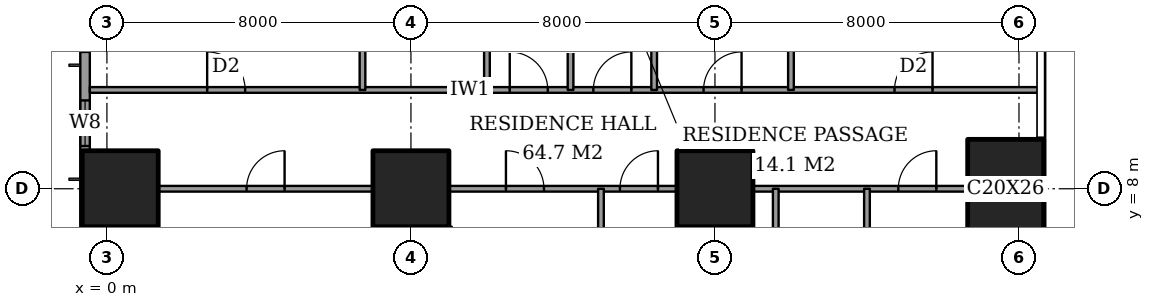
"""IFC4 building model, lengths in metres.
Left out: names, types, materials, properties, quantities, classifications, styles, units other than length and angle.
Written with IfcOpenShell. Run it as: python <this file> out.ifc"""

import sys

from ifc_helpers import new_model, si_unit, direction, frame, frame_2d, origin, origin_2d, place, context, subcontext, project, spatial, rectangle, extrude, element, fill, save


model = new_model("IFC4")
c1 = context("Model", 3, precision=1e-05, world=origin(), true_north=direction((0.0, 1.0)))
c2 = subcontext(c1, "Body", "Model", "MODEL_VIEW")
j1 = project(units=[si_unit("LENGTHUNIT", "METRE"), si_unit("PLANEANGLEUNIT", "RADIAN")], contexts=[c1])
p1 = place(None, origin())
s1 = spatial("IfcSite", under=j1, at=p1, CompositionType="ELEMENT")
p2 = place(p1, origin())
s2 = spatial("IfcBuilding", under=s1, at=p2, CompositionType="ELEMENT")
p3 = place(p2, frame((0.0, 0.0, 47.6)))
s3 = spatial("IfcBuildingStorey", under=s2, at=p3, CompositionType="ELEMENT", Elevation=47.6)
for number, where, z_axis, x_axis in (
    (1, (0.35, 8.0, 0.0), (0.0, 0.0, 1.0), (1.0, 0.0, 0.0)),
    (2, (8.0, 8.0, 0.0), (0.0, 0.0, 1.0), (1.0, 0.0, 0.0)),
    (3, (16.0, 8.0, 0.0), (0.0, 0.0, 1.0), (1.0, 0.0, 0.0)),
):
    element("IfcColumn", number, at=place(p3, frame(where, z_axis=z_axis, x_axis=x_axis)), inside=s3, PredefinedType="COLUMN", context=c2, shape_type="SweptSolid", body=[
        extrude(rectangle(XDim=2.0, YDim=2.0, at=origin_2d()), origin(), (0.0, 0.0, 1.0), 3.6),
    ])
p4 = place(p3, frame((23.65, 8.0, 0.0), z_axis=(0.0, 0.0, 1.0), x_axis=(1.0, 0.0, 0.0)))
e4 = element("IfcColumn", 4, at=p4, inside=s3, PredefinedType="COLUMN", context=c2, shape_type="SweptSolid", body=[
    extrude(rectangle(XDim=2.0, YDim=2.6, at=origin_2d()), origin(), (0.0, 0.0, 1.0), 3.6),
])
p5 = place(p3, frame((-0.575, 44.825, 0.0), z_axis=(0.0, 0.0, 1.0), x_axis=(0.0, -1.0, 0.0)))
e5 = element("IfcWall", 5, at=p5, inside=s3, PredefinedType="SOLIDWALL", context=c2, shape_type="SweptSolid", body=[
    extrude(rectangle(XDim=41.65, YDim=0.25, at=frame_2d((20.825, 0.0))), origin(), (0.0, 0.0, 1.0), 3.6),
])
p6 = place(p5, frame((0.775, 0.0, 0.6)))
e6 = element("IfcOpeningElement", 6, at=p6, cuts=e5, PredefinedType="OPENING", context=c2, shape_type="SweptSolid", body=[
    extrude(rectangle(XDim=2.4, YDim=2.0, at=frame_2d((1.2, 1.0))), frame((0.0, 0.135, 0.0), z_axis=(0.0, -1.0, 0.0), x_axis=(1.0, 0.0, 0.0)), (0.0, 0.0, 1.0), 0.27),
])
p7 = place(p5, frame((6.1, 0.0, 0.6)))
e7 = element("IfcOpeningElement", 7, at=p7, cuts=e5, PredefinedType="OPENING", context=c2, shape_type="SweptSolid", body=[
    extrude(rectangle(XDim=1.2, YDim=2.0, at=frame_2d((0.6, 1.0))), frame((0.0, 0.135, 0.0), z_axis=(0.0, -1.0, 0.0), x_axis=(1.0, 0.0, 0.0)), (0.0, 0.0, 1.0), 0.27),
])
p8 = place(p5, frame((8.425, 0.0, 0.6)))
e8 = element("IfcOpeningElement", 8, at=p8, cuts=e5, PredefinedType="OPENING", context=c2, shape_type="SweptSolid", body=[
    extrude(rectangle(XDim=2.4, YDim=2.0, at=frame_2d((1.2, 1.0))), frame((0.0, 0.135, 0.0), z_axis=(0.0, -1.0, 0.0), x_axis=(1.0, 0.0, 0.0)), (0.0, 0.0, 1.0), 0.27),
])
p9 = place(p5, frame((15.625, 0.0, 0.6)))
e9 = element("IfcOpeningElement", 9, at=p9, cuts=e5, PredefinedType="OPENING", context=c2, shape_type="SweptSolid", body=[
    extrude(rectangle(XDim=2.4, YDim=2.0, at=frame_2d((1.2, 1.0))), frame((0.0, 0.135, 0.0), z_axis=(0.0, -1.0, 0.0), x_axis=(1.0, 0.0, 0.0)), (0.0, 0.0, 1.0), 0.27),
])
p10 = place(p5, frame((23.625, 0.0, 0.6)))
e10 = element("IfcOpeningElement", 10, at=p10, cuts=e5, PredefinedType="OPENING", context=c2, shape_type="SweptSolid", body=[
    extrude(rectangle(XDim=2.4, YDim=2.0, at=frame_2d((1.2, 1.0))), frame((0.0, 0.135, 0.0), z_axis=(0.0, -1.0, 0.0), x_axis=(1.0, 0.0, 0.0)), (0.0, 0.0, 1.0), 0.27),
])
p11 = place(p5, frame((30.825, 0.0, 0.6)))
e11 = element("IfcOpeningElement", 11, at=p11, cuts=e5, PredefinedType="OPENING", context=c2, shape_type="SweptSolid", body=[
    extrude(rectangle(XDim=2.4, YDim=2.0, at=frame_2d((1.2, 1.0))), frame((0.0, 0.135, 0.0), z_axis=(0.0, -1.0, 0.0), x_axis=(1.0, 0.0, 0.0)), (0.0, 0.0, 1.0), 0.27),
])
p12 = place(p5, frame((34.5, 0.0, 0.6)))
e12 = element("IfcOpeningElement", 12, at=p12, cuts=e5, PredefinedType="OPENING", context=c2, shape_type="SweptSolid", body=[
    extrude(rectangle(XDim=1.2, YDim=2.0, at=frame_2d((0.6, 1.0))), frame((0.0, 0.135, 0.0), z_axis=(0.0, -1.0, 0.0), x_axis=(1.0, 0.0, 0.0)), (0.0, 0.0, 1.0), 0.27),
])
p13 = place(p5, frame((38.475, 0.0, 0.6)))
e13 = element("IfcOpeningElement", 13, at=p13, cuts=e5, PredefinedType="OPENING", context=c2, shape_type="SweptSolid", body=[
    extrude(rectangle(XDim=2.4, YDim=2.0, at=frame_2d((1.2, 1.0))), frame((0.0, 0.135, 0.0), z_axis=(0.0, -1.0, 0.0), x_axis=(1.0, 0.0, 0.0)), (0.0, 0.0, 1.0), 0.27),
])
p14 = place(p3, frame((1.35, 8.0, 0.0), z_axis=(0.0, 0.0, 1.0), x_axis=(1.0, 0.0, 0.0)))
e14 = element("IfcWall", 14, at=p14, inside=s3, PredefinedType="PARTITIONING", context=c2, shape_type="SweptSolid", body=[
    extrude(rectangle(XDim=5.65, YDim=0.15, at=frame_2d((2.825, 0.0))), origin(), (0.0, 0.0, 1.0), 3.35),
])
p15 = place(p14, frame((2.325, 0.0, 0.0)))
e15 = element("IfcOpeningElement", 15, at=p15, cuts=e14, PredefinedType="OPENING", context=c2, shape_type="SweptSolid", body=[
    extrude(rectangle(XDim=1.0, YDim=2.1, at=frame_2d((0.5, 1.05))), frame((0.0, 0.085, 0.0), z_axis=(0.0, -1.0, 0.0), x_axis=(1.0, 0.0, 0.0)), (0.0, 0.0, 1.0), 0.17),
])
p16 = place(p3, frame((9.0, 8.0, 0.0), z_axis=(0.0, 0.0, 1.0), x_axis=(1.0, 0.0, 0.0)))
e16 = element("IfcWall", 16, at=p16, inside=s3, PredefinedType="PARTITIONING", context=c2, shape_type="SweptSolid", body=[
    extrude(rectangle(XDim=6.0, YDim=0.15, at=frame_2d((3.0, 0.0))), origin(), (0.0, 0.0, 1.0), 3.35),
])
p17 = place(p16, frame((1.5, 0.0, 0.0)))
e17 = element("IfcOpeningElement", 17, at=p17, cuts=e16, PredefinedType="OPENING", context=c2, shape_type="SweptSolid", body=[
    extrude(rectangle(XDim=1.0, YDim=2.1, at=frame_2d((0.5, 1.05))), frame((0.0, 0.085, 0.0), z_axis=(0.0, -1.0, 0.0), x_axis=(1.0, 0.0, 0.0)), (0.0, 0.0, 1.0), 0.17),
])
p18 = place(p16, frame((4.5, 0.0, 0.0)))
e18 = element("IfcOpeningElement", 18, at=p18, cuts=e16, PredefinedType="OPENING", context=c2, shape_type="SweptSolid", body=[
    extrude(rectangle(XDim=1.0, YDim=2.1, at=frame_2d((0.5, 1.05))), frame((0.0, 0.085, 0.0), z_axis=(0.0, -1.0, 0.0), x_axis=(1.0, 0.0, 0.0)), (0.0, 0.0, 1.0), 0.17),
])
p19 = place(p3, frame((17.0, 8.0, 0.0), z_axis=(0.0, 0.0, 1.0), x_axis=(1.0, 0.0, 0.0)))
e19 = element("IfcWall", 19, at=p19, inside=s3, PredefinedType="PARTITIONING", context=c2, shape_type="SweptSolid", body=[
    extrude(rectangle(XDim=5.65, YDim=0.15, at=frame_2d((2.825, 0.0))), origin(), (0.0, 0.0, 1.0), 3.35),
])
p20 = place(p19, frame((3.825, 0.0, 0.0)))
e20 = element("IfcOpeningElement", 20, at=p20, cuts=e19, PredefinedType="OPENING", context=c2, shape_type="SweptSolid", body=[
    extrude(rectangle(XDim=1.0, YDim=2.1, at=frame_2d((0.5, 1.05))), frame((0.0, 0.085, 0.0), z_axis=(0.0, -1.0, 0.0), x_axis=(1.0, 0.0, 0.0)), (0.0, 0.0, 1.0), 0.17),
])
p21 = place(p3, frame((-0.45, 10.6, 0.0), z_axis=(0.0, 0.0, 1.0), x_axis=(1.0, 0.0, 0.0)))
e21 = element("IfcWall", 21, at=p21, inside=s3, PredefinedType="PARTITIONING", context=c2, shape_type="SweptSolid", body=[
    extrude(rectangle(XDim=25.011, YDim=0.15, at=frame_2d((12.505, 0.0))), origin(), (0.0, 0.0, 1.0), 3.35),
])
p22 = place(p21, frame((13.25, 0.0, 0.0)))
e22 = element("IfcOpeningElement", 22, at=p22, cuts=e21, PredefinedType="OPENING", context=c2, shape_type="SweptSolid", body=[
    extrude(rectangle(XDim=1.0, YDim=2.1, at=frame_2d((0.5, 1.05))), frame((0.0, 0.085, 0.0), z_axis=(0.0, -1.0, 0.0), x_axis=(1.0, 0.0, 0.0)), (0.0, 0.0, 1.0), 0.17),
])
p23 = place(p21, frame((3.087, 0.0, 0.0)))
e23 = element("IfcOpeningElement", 23, at=p23, cuts=e21, PredefinedType="OPENING", context=c2, shape_type="SweptSolid", body=[
    extrude(rectangle(XDim=1.0, YDim=2.1, at=frame_2d((0.5, 1.05))), frame((0.0, 0.085, 0.0), z_axis=(0.0, -1.0, 0.0), x_axis=(1.0, 0.0, 0.0)), (0.0, 0.0, 1.0), 0.17),
])
p24 = place(p21, frame((11.05, 0.0, 0.0)))
e24 = element("IfcOpeningElement", 24, at=p24, cuts=e21, PredefinedType="OPENING", context=c2, shape_type="SweptSolid", body=[
    extrude(rectangle(XDim=1.0, YDim=2.1, at=frame_2d((0.5, 1.05))), frame((0.0, 0.085, 0.0), z_axis=(0.0, -1.0, 0.0), x_axis=(1.0, 0.0, 0.0)), (0.0, 0.0, 1.0), 0.17),
])
p25 = place(p21, frame((16.15, 0.0, 0.0)))
e25 = element("IfcOpeningElement", 25, at=p25, cuts=e21, PredefinedType="OPENING", context=c2, shape_type="SweptSolid", body=[
    extrude(rectangle(XDim=1.0, YDim=2.1, at=frame_2d((0.5, 1.05))), frame((0.0, 0.085, 0.0), z_axis=(0.0, -1.0, 0.0), x_axis=(1.0, 0.0, 0.0)), (0.0, 0.0, 1.0), 0.17),
])
p26 = place(p21, frame((21.175, 0.0, 0.0)))
e26 = element("IfcOpeningElement", 26, at=p26, cuts=e21, PredefinedType="OPENING", context=c2, shape_type="SweptSolid", body=[
    extrude(rectangle(XDim=1.0, YDim=2.1, at=frame_2d((0.5, 1.05))), frame((0.0, 0.085, 0.0), z_axis=(0.0, -1.0, 0.0), x_axis=(1.0, 0.0, 0.0)), (0.0, 0.0, 1.0), 0.17),
])
p27 = place(p3, frame((6.725, 10.6, 0.0), z_axis=(0.0, 0.0, 1.0), x_axis=(0.0, 1.0, 0.0)))
e27 = element("IfcWall", 27, at=p27, inside=s3, PredefinedType="PARTITIONING", context=c2, shape_type="SweptSolid", body=[
    extrude(rectangle(XDim=4.2, YDim=0.15, at=frame_2d((2.1, 0.0))), origin(), (0.0, 0.0, 1.0), 3.35),
])
p28 = place(p27, frame((1.2, 0.0, 0.0)))
e28 = element("IfcOpeningElement", 28, at=p28, cuts=e27, PredefinedType="OPENING", context=c2, shape_type="SweptSolid", body=[
    extrude(rectangle(XDim=0.9, YDim=2.1, at=frame_2d((0.45, 1.05))), frame((0.0, 0.085, 0.0), z_axis=(0.0, -1.0, 0.0), x_axis=(1.0, 0.0, 0.0)), (0.0, 0.0, 1.0), 0.17),
])
p29 = place(p3, frame((10.0, 10.6, 0.0), z_axis=(0.0, 0.0, 1.0), x_axis=(0.0, 1.0, 0.0)))
e29 = element("IfcWall", 29, at=p29, inside=s3, PredefinedType="PARTITIONING", context=c2, shape_type="SweptSolid", body=[
    extrude(rectangle(XDim=11.0, YDim=0.15, at=frame_2d((5.5, 0.0))), origin(), (0.0, 0.0, 1.0), 3.35),
])
p30 = place(p29, frame((8.2, 0.0, 0.0)))
e30 = element("IfcOpeningElement", 30, at=p30, cuts=e29, PredefinedType="OPENING", context=c2, shape_type="SweptSolid", body=[
    extrude(rectangle(XDim=1.0, YDim=2.1, at=frame_2d((0.5, 1.05))), frame((0.0, 0.085, 0.0), z_axis=(0.0, -1.0, 0.0), x_axis=(1.0, 0.0, 0.0)), (0.0, 0.0, 1.0), 0.17),
])
p31 = place(p3, frame((12.2, 10.6, 0.0), z_axis=(0.0, 0.0, 1.0), x_axis=(0.0, 1.0, 0.0)))
e31 = element("IfcWall", 31, at=p31, inside=s3, PredefinedType="PARTITIONING", context=c2, shape_type="SweptSolid", body=[
    extrude(rectangle(XDim=6.4, YDim=0.15, at=frame_2d((3.2, 0.0))), origin(), (0.0, 0.0, 1.0), 3.35),
])
p32 = place(p3, frame((13.0, -0.45, 0.0), z_axis=(0.0, 0.0, 1.0), x_axis=(0.0, 1.0, 0.0)))
e32 = element("IfcWall", 32, at=p32, inside=s3, PredefinedType="PARTITIONING", context=c2, shape_type="SweptSolid", body=[
    extrude(rectangle(XDim=8.45, YDim=0.15, at=frame_2d((4.225, 0.0))), origin(), (0.0, 0.0, 1.0), 3.35),
])
p33 = place(p3, frame((14.4, 10.6, 0.0), z_axis=(0.0, 0.0, 1.0), x_axis=(0.0, 1.0, 0.0)))
e33 = element("IfcWall", 33, at=p33, inside=s3, PredefinedType="PARTITIONING", context=c2, shape_type="SweptSolid", body=[
    extrude(rectangle(XDim=6.4, YDim=0.15, at=frame_2d((3.2, 0.0))), origin(), (0.0, 0.0, 1.0), 3.35),
])
p34 = place(p3, frame((17.6, -0.45, 0.0), z_axis=(0.0, 0.0, 1.0), x_axis=(0.0, 1.0, 0.0)))
e34 = element("IfcWall", 34, at=p34, inside=s3, PredefinedType="PARTITIONING", context=c2, shape_type="SweptSolid", body=[
    extrude(rectangle(XDim=8.45, YDim=0.15, at=frame_2d((4.225, 0.0))), origin(), (0.0, 0.0, 1.0), 3.35),
])
p35 = place(p3, frame((18.0, 10.6, 0.0), z_axis=(0.0, 0.0, 1.0), x_axis=(0.0, 1.0, 0.0)))
e35 = element("IfcWall", 35, at=p35, inside=s3, PredefinedType="PARTITIONING", context=c2, shape_type="SweptSolid", body=[
    extrude(rectangle(XDim=6.4, YDim=0.15, at=frame_2d((3.2, 0.0))), origin(), (0.0, 0.0, 1.0), 3.35),
])
p36 = place(p3, frame((20.0, -0.45, 0.0), z_axis=(0.0, 0.0, 1.0), x_axis=(0.0, 1.0, 0.0)))
e36 = element("IfcWall", 36, at=p36, inside=s3, PredefinedType="PARTITIONING", context=c2, shape_type="SweptSolid", body=[
    extrude(rectangle(XDim=8.45, YDim=0.15, at=frame_2d((4.225, 0.0))), origin(), (0.0, 0.0, 1.0), 3.35),
])
p37 = place(p36, frame((3.775, 0.0, 0.0)))
e37 = element("IfcOpeningElement", 37, at=p37, cuts=e36, PredefinedType="OPENING", context=c2, shape_type="SweptSolid", body=[
    extrude(rectangle(XDim=0.9, YDim=2.1, at=frame_2d((0.45, 1.05))), frame((0.0, 0.085, 0.0), z_axis=(0.0, -1.0, 0.0), x_axis=(1.0, 0.0, 0.0)), (0.0, 0.0, 1.0), 0.17),
])
p38 = place(p12, origin())
e38 = element("IfcWindow", 38, at=p38, inside=s3, PartitioningType="SINGLE_PANEL", PredefinedType="WINDOW", context=c2, shape_type="SweptSolid", body=[
    extrude(rectangle(XDim=1.2, YDim=2.0, at=frame_2d((0.6, 1.0))), frame((0.0, 0.03, 0.0), z_axis=(0.0, -1.0, 0.0), x_axis=(1.0, 0.0, 0.0)), (0.0, 0.0, 1.0), 0.06),
])
fill(e12, e38)
p39 = place(p15, origin())
e39 = element("IfcDoor", 39, at=p39, inside=s3, OperationType="SINGLE_SWING_LEFT", PredefinedType="DOOR", context=c2, shape_type="SweptSolid", body=[
    extrude(rectangle(XDim=1.0, YDim=2.1, at=frame_2d((0.5, 1.05))), frame((0.0, 0.025, 0.0), z_axis=(0.0, -1.0, 0.0), x_axis=(1.0, 0.0, 0.0)), (0.0, 0.0, 1.0), 0.05),
])
fill(e15, e39)
p40 = place(p17, origin())
e40 = element("IfcDoor", 40, at=p40, inside=s3, OperationType="SINGLE_SWING_RIGHT", PredefinedType="DOOR", context=c2, shape_type="SweptSolid", body=[
    extrude(rectangle(XDim=1.0, YDim=2.1, at=frame_2d((0.5, 1.05))), frame((0.0, 0.025, 0.0), z_axis=(0.0, -1.0, 0.0), x_axis=(1.0, 0.0, 0.0)), (0.0, 0.0, 1.0), 0.05),
])
fill(e17, e40)
p41 = place(p18, origin())
e41 = element("IfcDoor", 41, at=p41, inside=s3, OperationType="SINGLE_SWING_LEFT", PredefinedType="DOOR", context=c2, shape_type="SweptSolid", body=[
    extrude(rectangle(XDim=1.0, YDim=2.1, at=frame_2d((0.5, 1.05))), frame((0.0, 0.025, 0.0), z_axis=(0.0, -1.0, 0.0), x_axis=(1.0, 0.0, 0.0)), (0.0, 0.0, 1.0), 0.05),
])
fill(e18, e41)
p42 = place(p20, origin())
e42 = element("IfcDoor", 42, at=p42, inside=s3, OperationType="SINGLE_SWING_LEFT", PredefinedType="DOOR", context=c2, shape_type="SweptSolid", body=[
    extrude(rectangle(XDim=1.0, YDim=2.1, at=frame_2d((0.5, 1.05))), frame((0.0, 0.025, 0.0), z_axis=(0.0, -1.0, 0.0), x_axis=(1.0, 0.0, 0.0)), (0.0, 0.0, 1.0), 0.05),
])
fill(e20, e42)
p43 = place(p22, origin())
e43 = element("IfcDoor", 43, at=p43, inside=s3, OperationType="SINGLE_SWING_LEFT", PredefinedType="DOOR", context=c2, shape_type="SweptSolid", body=[
    extrude(rectangle(XDim=1.0, YDim=2.1, at=frame_2d((0.5, 1.05))), frame((0.0, 0.025, 0.0), z_axis=(0.0, -1.0, 0.0), x_axis=(1.0, 0.0, 0.0)), (0.0, 0.0, 1.0), 0.05),
])
fill(e22, e43)
p44 = place(p23, origin())
e44 = element("IfcDoor", 44, at=p44, inside=s3, OperationType="SINGLE_SWING_RIGHT", PredefinedType="DOOR", context=c2, shape_type="SweptSolid", body=[
    extrude(rectangle(XDim=1.0, YDim=2.1, at=frame_2d((0.5, 1.05))), frame((0.0, 0.025, 0.0), z_axis=(0.0, -1.0, 0.0), x_axis=(1.0, 0.0, 0.0)), (0.0, 0.0, 1.0), 0.05),
])
fill(e23, e44)
p45 = place(p24, origin())
e45 = element("IfcDoor", 45, at=p45, inside=s3, OperationType="SINGLE_SWING_RIGHT", PredefinedType="DOOR", context=c2, shape_type="SweptSolid", body=[
    extrude(rectangle(XDim=1.0, YDim=2.1, at=frame_2d((0.5, 1.05))), frame((0.0, 0.025, 0.0), z_axis=(0.0, -1.0, 0.0), x_axis=(1.0, 0.0, 0.0)), (0.0, 0.0, 1.0), 0.05),
])
fill(e24, e45)
p46 = place(p25, origin())
e46 = element("IfcDoor", 46, at=p46, inside=s3, OperationType="SINGLE_SWING_LEFT", PredefinedType="DOOR", context=c2, shape_type="SweptSolid", body=[
    extrude(rectangle(XDim=1.0, YDim=2.1, at=frame_2d((0.5, 1.05))), frame((0.0, 0.025, 0.0), z_axis=(0.0, -1.0, 0.0), x_axis=(1.0, 0.0, 0.0)), (0.0, 0.0, 1.0), 0.05),
])
fill(e25, e46)
p47 = place(p26, origin())
e47 = element("IfcDoor", 47, at=p47, inside=s3, OperationType="SINGLE_SWING_LEFT", PredefinedType="DOOR", context=c2, shape_type="SweptSolid", body=[
    extrude(rectangle(XDim=1.0, YDim=2.1, at=frame_2d((0.5, 1.05))), frame((0.0, 0.025, 0.0), z_axis=(0.0, -1.0, 0.0), x_axis=(1.0, 0.0, 0.0)), (0.0, 0.0, 1.0), 0.05),
])
fill(e26, e47)
save(model, sys.argv[1])
